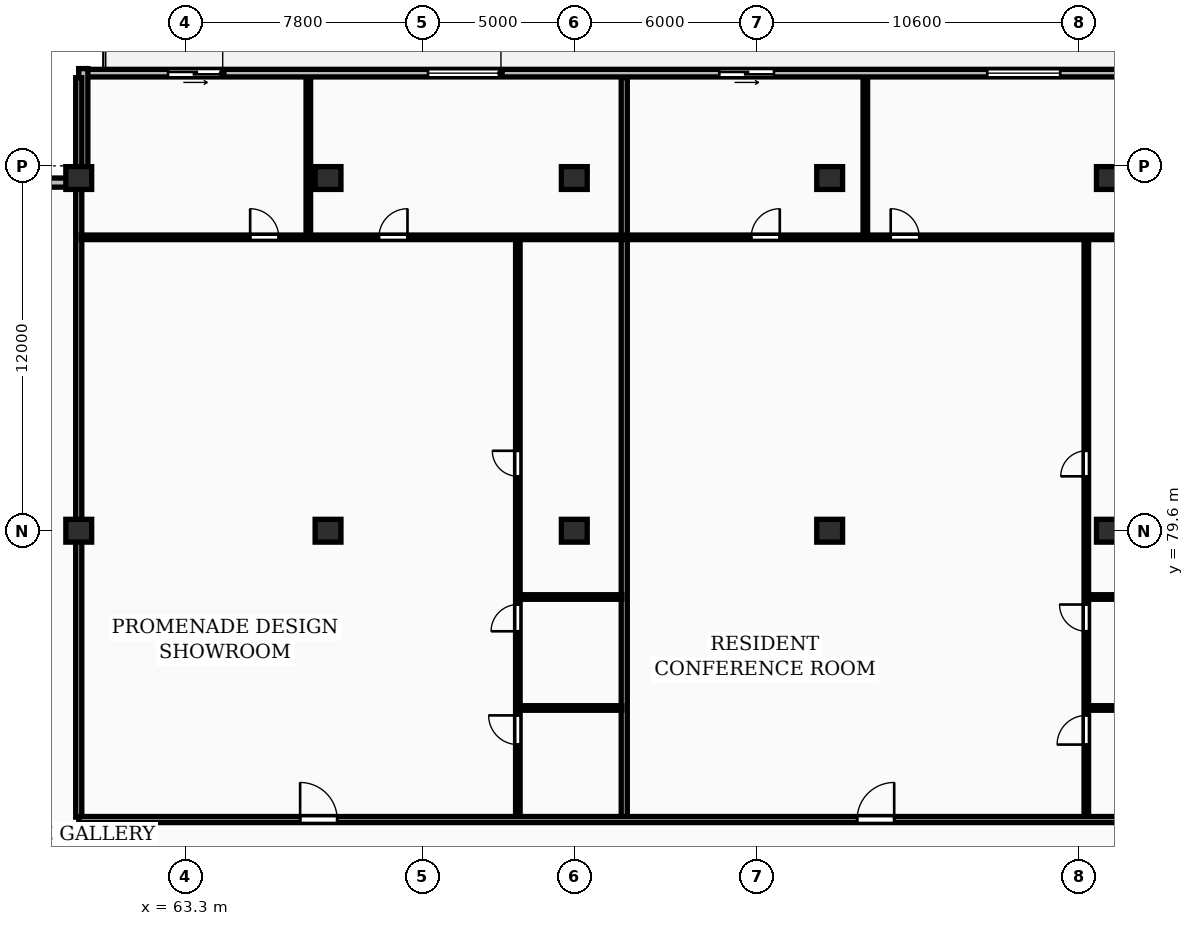
"""IFC4 building model, lengths in metres.
Left out: names, types, materials, properties, quantities, classifications, styles, units other than length and angle.
Written with IfcOpenShell. Run it as: python <this file> out.ifc"""

import sys

from ifc_helpers import new_model, si_unit, direction, frame, frame_2d, origin, origin_2d, place, context, subcontext, project, spatial, rectangle, extrude, element, fill, save


model = new_model("IFC4")
c1 = context("Model", 3, precision=1e-05, world=origin(), true_north=direction((0.0, 1.0)))
c2 = subcontext(c1, "Body", "Model", "MODEL_VIEW")
j1 = project(units=[si_unit("LENGTHUNIT", "METRE"), si_unit("PLANEANGLEUNIT", "RADIAN")], contexts=[c1])
p1 = place(None, origin())
s1 = spatial("IfcSite", under=j1, at=p1, CompositionType="ELEMENT")
p2 = place(p1, origin())
s2 = spatial("IfcBuilding", under=s1, at=p2, CompositionType="ELEMENT")
p3 = place(p2, frame((0.0, 0.0, 201.1)))
s3 = spatial("IfcBuildingStorey", under=s2, at=p3, CompositionType="ELEMENT", Elevation=201.1)
for number, where, z_axis, x_axis in (
    (1, (59.8, 79.6, 0.0), (0.0, 0.0, 1.0), (1.0, 0.0, 0.0)),
    (2, (59.8, 91.2, 0.0), (0.0, 0.0, 1.0), (1.0, 0.0, 0.0)),
    (3, (68.0, 79.6, 0.0), (0.0, 0.0, 1.0), (1.0, 0.0, 0.0)),
    (4, (68.0, 91.2, 0.0), (0.0, 0.0, 1.0), (1.0, 0.0, 0.0)),
    (5, (76.1, 79.6, 0.0), (0.0, 0.0, 1.0), (1.0, 0.0, 0.0)),
    (6, (76.1, 91.2, 0.0), (0.0, 0.0, 1.0), (1.0, 0.0, 0.0)),
    (7, (84.5, 79.6, 0.0), (0.0, 0.0, 1.0), (1.0, 0.0, 0.0)),
    (8, (84.5, 91.2, 0.0), (0.0, 0.0, 1.0), (1.0, 0.0, 0.0)),
    (9, (93.7, 79.6, 0.0), (0.0, 0.0, 1.0), (1.0, 0.0, 0.0)),
    (10, (93.7, 91.2, 0.0), (0.0, 0.0, 1.0), (1.0, 0.0, 0.0)),
):
    element("IfcColumn", number, at=place(p3, frame(where, z_axis=z_axis, x_axis=x_axis)), inside=s3, PredefinedType="COLUMN", context=c2, shape_type="SweptSolid", body=[
        extrude(rectangle(XDim=0.85, YDim=0.75, at=origin_2d()), origin(), (0.0, 0.0, 1.0), 3.25),
    ])
p4 = place(p3, frame((128.4, 94.65, 0.0), z_axis=(0.0, 0.0, 1.0), x_axis=(-1.0, 0.0, 0.0)))
e11 = element("IfcWall", 11, at=p4, inside=s3, PredefinedType="STANDARD", context=c2, shape_type="SweptSolid", body=[
    extrude(rectangle(XDim=68.6, YDim=0.25, at=frame_2d((34.3, 0.0))), origin(), (0.0, 0.0, 1.0), 2.97),
])
p5 = place(p4, frame((63.864, 0.0, 0.0)))
e12 = element("IfcOpeningElement", 12, at=p5, cuts=e11, PredefinedType="OPENING", context=c2, shape_type="SweptSolid", body=[
    extrude(rectangle(XDim=1.8, YDim=2.2, at=frame_2d((0.9, 1.1))), frame((0.0, 0.135, 0.0), z_axis=(0.0, -1.0, 0.0), x_axis=(1.0, 0.0, 0.0)), (0.0, 0.0, 1.0), 0.27),
])
p6 = place(p4, frame((54.713, 0.0, 0.85)))
e13 = element("IfcOpeningElement", 13, at=p6, cuts=e11, PredefinedType="OPENING", context=c2, shape_type="SweptSolid", body=[
    extrude(rectangle(XDim=2.4, YDim=1.9, at=frame_2d((1.2, 0.95))), frame((0.0, 0.135, 0.0), z_axis=(0.0, -1.0, 0.0), x_axis=(1.0, 0.0, 0.0)), (0.0, 0.0, 1.0), 0.27),
])
p7 = place(p4, frame((45.732, 0.0, 0.0)))
e14 = element("IfcOpeningElement", 14, at=p7, cuts=e11, PredefinedType="OPENING", context=c2, shape_type="SweptSolid", body=[
    extrude(rectangle(XDim=1.8, YDim=2.2, at=frame_2d((0.9, 1.1))), frame((0.0, 0.135, 0.0), z_axis=(0.0, -1.0, 0.0), x_axis=(1.0, 0.0, 0.0)), (0.0, 0.0, 1.0), 0.27),
])
p8 = place(p4, frame((36.318, 0.0, 0.85)))
e15 = element("IfcOpeningElement", 15, at=p8, cuts=e11, PredefinedType="OPENING", context=c2, shape_type="SweptSolid", body=[
    extrude(rectangle(XDim=2.4, YDim=1.9, at=frame_2d((1.2, 0.95))), frame((0.0, 0.135, 0.0), z_axis=(0.0, -1.0, 0.0), x_axis=(1.0, 0.0, 0.0)), (0.0, 0.0, 1.0), 0.27),
])
p9 = place(p4, frame((23.021, 0.0, 0.85)))
e16 = element("IfcOpeningElement", 16, at=p9, cuts=e11, PredefinedType="OPENING", context=c2, shape_type="SweptSolid", body=[
    extrude(rectangle(XDim=2.4, YDim=1.9, at=frame_2d((1.2, 0.95))), frame((0.0, 0.135, 0.0), z_axis=(0.0, -1.0, 0.0), x_axis=(1.0, 0.0, 0.0)), (0.0, 0.0, 1.0), 0.27),
])
p10 = place(p4, frame((29.043, 0.0, 0.0)))
e17 = element("IfcOpeningElement", 17, at=p10, cuts=e11, PredefinedType="OPENING", context=c2, shape_type="SweptSolid", body=[
    extrude(rectangle(XDim=1.8, YDim=2.2, at=frame_2d((0.9, 1.1))), frame((0.0, 0.135, 0.0), z_axis=(0.0, -1.0, 0.0), x_axis=(1.0, 0.0, 0.0)), (0.0, 0.0, 1.0), 0.27),
])
p11 = place(p4, frame((17.209, 0.0, 0.85)))
e18 = element("IfcOpeningElement", 18, at=p11, cuts=e11, PredefinedType="OPENING", context=c2, shape_type="SweptSolid", body=[
    extrude(rectangle(XDim=2.4, YDim=1.9, at=frame_2d((1.2, 0.95))), frame((0.0, 0.135, 0.0), z_axis=(0.0, -1.0, 0.0), x_axis=(1.0, 0.0, 0.0)), (0.0, 0.0, 1.0), 0.27),
])
p12 = place(p4, frame((6.712, 0.0, 0.85)))
e19 = element("IfcOpeningElement", 19, at=p12, cuts=e11, PredefinedType="OPENING", context=c2, shape_type="SweptSolid", body=[
    extrude(rectangle(XDim=2.4, YDim=1.9, at=frame_2d((1.2, 0.95))), frame((0.0, 0.135, 0.0), z_axis=(0.0, -1.0, 0.0), x_axis=(1.0, 0.0, 0.0)), (0.0, 0.0, 1.0), 0.27),
])
p13 = place(p4, frame((12.824, 0.0, 0.0)))
e20 = element("IfcOpeningElement", 20, at=p13, cuts=e11, PredefinedType="OPENING", context=c2, shape_type="SweptSolid", body=[
    extrude(rectangle(XDim=1.8, YDim=2.2, at=frame_2d((0.9, 1.1))), frame((0.0, 0.135, 0.0), z_axis=(0.0, -1.0, 0.0), x_axis=(1.0, 0.0, 0.0)), (0.0, 0.0, 1.0), 0.27),
])
p14 = place(p4, frame((1.025, 0.0, 0.85)))
e21 = element("IfcOpeningElement", 21, at=p14, cuts=e11, PredefinedType="OPENING", context=c2, shape_type="SweptSolid", body=[
    extrude(rectangle(XDim=2.4, YDim=1.9, at=frame_2d((1.2, 0.95))), frame((0.0, 0.135, 0.0), z_axis=(0.0, -1.0, 0.0), x_axis=(1.0, 0.0, 0.0)), (0.0, 0.0, 1.0), 0.27),
])
for number, where, z_axis, x_axis in (
    (22, (59.95, 94.8, 0.0), (0.0, 0.0, 1.0), (0.0, -1.0, 0.0)),
    (23, (59.8, 91.05, 0.0), (0.0, 0.0, 1.0), (-1.0, 0.0, 0.0)),
):
    element("IfcWall", number, at=place(p3, frame(where, z_axis=z_axis, x_axis=x_axis)), inside=s3, PredefinedType="STANDARD", context=c2, shape_type="SweptSolid", body=[
        extrude(rectangle(XDim=3.6, YDim=0.3, at=frame_2d((1.8, 0.0))), origin(), (0.0, 0.0, 1.0), 2.97),
    ])
p15 = place(p3, frame((59.8, 70.18, 0.0), z_axis=(0.0, 0.0, 1.0), x_axis=(0.0, 1.0, 0.0)))
e24 = element("IfcWall", 24, at=p15, inside=s3, PredefinedType="PARTITIONING", context=c2, shape_type="SweptSolid", body=[
    extrude(rectangle(XDim=24.32, YDim=0.2, at=frame_2d((12.16, 0.0))), origin(), (0.0, 0.0, 1.0), 2.277),
])
p16 = place(p3, frame((77.743, 70.18, 0.0), z_axis=(0.0, 0.0, 1.0), x_axis=(0.0, 1.0, 0.0)))
e25 = element("IfcWall", 25, at=p16, inside=s3, PredefinedType="PARTITIONING", context=c2, shape_type="SweptSolid", body=[
    extrude(rectangle(XDim=24.32, YDim=0.2, at=frame_2d((12.16, 0.0))), origin(), (0.0, 0.0, 1.0), 2.97),
])
for number, where, z_axis, x_axis in (
    (26, (74.303, 73.77, 0.0), (0.0, 0.0, 1.0), (1.0, 0.0, 0.0)),
    (27, (74.303, 77.42, 0.0), (0.0, 0.0, 1.0), (1.0, 0.0, 0.0)),
):
    element("IfcWall", number, at=place(p3, frame(where, z_axis=z_axis, x_axis=x_axis)), inside=s3, PredefinedType="PARTITIONING", context=c2, shape_type="SweptSolid", body=[
        extrude(rectangle(XDim=3.36, YDim=0.15, at=frame_2d((1.68, 0.0))), origin(), (0.0, 0.0, 1.0), 2.97),
    ])
p17 = place(p3, frame((74.243, 70.16, 0.0), z_axis=(0.0, 0.0, 1.0), x_axis=(0.0, 1.0, 0.0)))
e28 = element("IfcWall", 28, at=p17, inside=s3, PredefinedType="PARTITIONING", context=c2, shape_type="SweptSolid", body=[
    extrude(rectangle(XDim=19.03, YDim=0.15, at=frame_2d((9.515, 0.0))), origin(), (0.0, 0.0, 1.0), 2.97),
])
p18 = place(p17, frame((2.406, 0.0, 0.0)))
e29 = element("IfcOpeningElement", 29, at=p18, cuts=e28, PredefinedType="OPENING", context=c2, shape_type="SweptSolid", body=[
    extrude(rectangle(XDim=0.96, YDim=2.1, at=frame_2d((0.48, 1.05))), frame((0.0, 0.085, 0.0), z_axis=(0.0, -1.0, 0.0), x_axis=(1.0, 0.0, 0.0)), (0.0, 0.0, 1.0), 0.17),
])
p19 = place(p17, frame((6.133, 0.0, 0.0)))
e30 = element("IfcOpeningElement", 30, at=p19, cuts=e28, PredefinedType="OPENING", context=c2, shape_type="SweptSolid", body=[
    extrude(rectangle(XDim=0.88, YDim=2.06, at=frame_2d((0.44, 1.03))), frame((0.0, 0.085, 0.0), z_axis=(0.0, -1.0, 0.0), x_axis=(1.0, 0.0, 0.0)), (0.0, 0.0, 1.0), 0.17),
])
p20 = place(p17, frame((11.229, 0.0, 0.0)))
e31 = element("IfcOpeningElement", 31, at=p20, cuts=e28, PredefinedType="OPENING", context=c2, shape_type="SweptSolid", body=[
    extrude(rectangle(XDim=0.84, YDim=2.04, at=frame_2d((0.42, 1.02))), frame((0.0, 0.085, 0.0), z_axis=(0.0, -1.0, 0.0), x_axis=(1.0, 0.0, 0.0)), (0.0, 0.0, 1.0), 0.17),
])
p21 = place(p3, frame((67.352, 89.33, 0.0), z_axis=(0.0, 0.0, 1.0), x_axis=(0.0, 1.0, 0.0)))
e32 = element("IfcWall", 32, at=p21, inside=s3, PredefinedType="PARTITIONING", context=c2, shape_type="SweptSolid", body=[
    extrude(rectangle(XDim=5.17, YDim=0.15, at=frame_2d((2.585, 0.0))), origin(), (0.0, 0.0, 1.0), 2.97),
])
p22 = place(p3, frame((59.88, 89.25, 0.0), z_axis=(0.0, 0.0, 1.0), x_axis=(1.0, 0.0, 0.0)))
e33 = element("IfcWall", 33, at=p22, inside=s3, PredefinedType="PARTITIONING", context=c2, shape_type="SweptSolid", body=[
    extrude(rectangle(XDim=17.783, YDim=0.15, at=frame_2d((8.892, 0.0))), origin(), (0.0, 0.0, 1.0), 2.97),
])
p23 = place(p22, frame((5.558, 0.0, 0.0)))
e34 = element("IfcOpeningElement", 34, at=p23, cuts=e33, PredefinedType="OPENING", context=c2, shape_type="SweptSolid", body=[
    extrude(rectangle(XDim=0.94, YDim=2.1, at=frame_2d((0.47, 1.05))), frame((0.0, 0.085, 0.0), z_axis=(0.0, -1.0, 0.0), x_axis=(1.0, 0.0, 0.0)), (0.0, 0.0, 1.0), 0.17),
])
p24 = place(p22, frame((9.793, 0.0, 0.0)))
e35 = element("IfcOpeningElement", 35, at=p24, cuts=e33, PredefinedType="OPENING", context=c2, shape_type="SweptSolid", body=[
    extrude(rectangle(XDim=0.94, YDim=2.1, at=frame_2d((0.47, 1.05))), frame((0.0, 0.085, 0.0), z_axis=(0.0, -1.0, 0.0), x_axis=(1.0, 0.0, 0.0)), (0.0, 0.0, 1.0), 0.17),
])
for number, where, z_axis, x_axis in (
    (36, (93.002, 73.77, 0.0), (0.0, 0.0, 1.0), (1.0, 0.0, 0.0)),
    (37, (93.002, 77.42, 0.0), (0.0, 0.0, 1.0), (1.0, 0.0, 0.0)),
):
    element("IfcWall", number, at=place(p3, frame(where, z_axis=z_axis, x_axis=x_axis)), inside=s3, PredefinedType="PARTITIONING", context=c2, shape_type="SweptSolid", body=[
        extrude(rectangle(XDim=3.13, YDim=0.15, at=frame_2d((1.565, 0.0))), origin(), (0.0, 0.0, 1.0), 2.97),
    ])
p25 = place(p3, frame((92.942, 70.16, 0.0), z_axis=(0.0, 0.0, 1.0), x_axis=(0.0, 1.0, 0.0)))
e38 = element("IfcWall", 38, at=p25, inside=s3, PredefinedType="PARTITIONING", context=c2, shape_type="SweptSolid", body=[
    extrude(rectangle(XDim=19.03, YDim=0.15, at=frame_2d((9.515, 0.0))), origin(), (0.0, 0.0, 1.0), 2.97),
])
p26 = place(p25, frame((2.406, 0.0, 0.0)))
e39 = element("IfcOpeningElement", 39, at=p26, cuts=e38, PredefinedType="OPENING", context=c2, shape_type="SweptSolid", body=[
    extrude(rectangle(XDim=0.96, YDim=2.1, at=frame_2d((0.48, 1.05))), frame((0.0, 0.085, 0.0), z_axis=(0.0, -1.0, 0.0), x_axis=(1.0, 0.0, 0.0)), (0.0, 0.0, 1.0), 0.17),
])
p27 = place(p25, frame((6.133, 0.0, 0.0)))
e40 = element("IfcOpeningElement", 40, at=p27, cuts=e38, PredefinedType="OPENING", context=c2, shape_type="SweptSolid", body=[
    extrude(rectangle(XDim=0.88, YDim=2.06, at=frame_2d((0.44, 1.03))), frame((0.0, 0.085, 0.0), z_axis=(0.0, -1.0, 0.0), x_axis=(1.0, 0.0, 0.0)), (0.0, 0.0, 1.0), 0.17),
])
p28 = place(p25, frame((11.229, 0.0, 0.0)))
e41 = element("IfcOpeningElement", 41, at=p28, cuts=e38, PredefinedType="OPENING", context=c2, shape_type="SweptSolid", body=[
    extrude(rectangle(XDim=0.84, YDim=2.04, at=frame_2d((0.42, 1.02))), frame((0.0, 0.085, 0.0), z_axis=(0.0, -1.0, 0.0), x_axis=(1.0, 0.0, 0.0)), (0.0, 0.0, 1.0), 0.17),
])
p29 = place(p3, frame((85.672, 89.33, 0.0), z_axis=(0.0, 0.0, 1.0), x_axis=(0.0, 1.0, 0.0)))
e42 = element("IfcWall", 42, at=p29, inside=s3, PredefinedType="PARTITIONING", context=c2, shape_type="SweptSolid", body=[
    extrude(rectangle(XDim=5.17, YDim=0.15, at=frame_2d((2.585, 0.0))), origin(), (0.0, 0.0, 1.0), 2.97),
])
p30 = place(p3, frame((77.823, 89.25, 0.0), z_axis=(0.0, 0.0, 1.0), x_axis=(1.0, 0.0, 0.0)))
e43 = element("IfcWall", 43, at=p30, inside=s3, PredefinedType="PARTITIONING", context=c2, shape_type="SweptSolid", body=[
    extrude(rectangle(XDim=18.308, YDim=0.15, at=frame_2d((9.154, 0.0))), origin(), (0.0, 0.0, 1.0), 2.97),
])
p31 = place(p30, frame((4.095, 0.0, 0.0)))
e44 = element("IfcOpeningElement", 44, at=p31, cuts=e43, PredefinedType="OPENING", context=c2, shape_type="SweptSolid", body=[
    extrude(rectangle(XDim=0.94, YDim=2.1, at=frame_2d((0.47, 1.05))), frame((0.0, 0.085, 0.0), z_axis=(0.0, -1.0, 0.0), x_axis=(1.0, 0.0, 0.0)), (0.0, 0.0, 1.0), 0.17),
])
p32 = place(p30, frame((8.684, 0.0, 0.0)))
e45 = element("IfcOpeningElement", 45, at=p32, cuts=e43, PredefinedType="OPENING", context=c2, shape_type="SweptSolid", body=[
    extrude(rectangle(XDim=0.94, YDim=2.1, at=frame_2d((0.47, 1.05))), frame((0.0, 0.085, 0.0), z_axis=(0.0, -1.0, 0.0), x_axis=(1.0, 0.0, 0.0)), (0.0, 0.0, 1.0), 0.17),
])
p33 = place(p3, frame((59.8, 70.1, 0.0), z_axis=(0.0, 0.0, 1.0), x_axis=(1.0, 0.0, 0.0)))
e46 = element("IfcWall", 46, at=p33, inside=s3, PredefinedType="PARTITIONING", context=c2, shape_type="SweptSolid", body=[
    extrude(rectangle(XDim=68.6, YDim=0.2, at=frame_2d((34.3, 0.0))), origin(), (0.0, 0.0, 1.0), 2.97),
])
p34 = place(p33, frame((7.281, 0.0, 0.0)))
e47 = element("IfcOpeningElement", 47, at=p34, cuts=e46, PredefinedType="OPENING", context=c2, shape_type="SweptSolid", body=[
    extrude(rectangle(XDim=1.22, YDim=2.18, at=frame_2d((0.61, 1.09))), frame((0.0, 0.11, 0.0), z_axis=(0.0, -1.0, 0.0), x_axis=(1.0, 0.0, 0.0)), (0.0, 0.0, 1.0), 0.22),
])
p35 = place(p33, frame((25.602, 0.0, 0.0)))
e48 = element("IfcOpeningElement", 48, at=p35, cuts=e46, PredefinedType="OPENING", context=c2, shape_type="SweptSolid", body=[
    extrude(rectangle(XDim=1.22, YDim=2.18, at=frame_2d((0.61, 1.09))), frame((0.0, 0.11, 0.0), z_axis=(0.0, -1.0, 0.0), x_axis=(1.0, 0.0, 0.0)), (0.0, 0.0, 1.0), 0.22),
])
p36 = place(p33, frame((38.457, 0.0, 0.0)))
e49 = element("IfcOpeningElement", 49, at=p36, cuts=e46, PredefinedType="OPENING", context=c2, shape_type="SweptSolid", body=[
    extrude(rectangle(XDim=0.95, YDim=2.15, at=frame_2d((0.475, 1.075))), frame((0.0, 0.11, 0.0), z_axis=(0.0, -1.0, 0.0), x_axis=(1.0, 0.0, 0.0)), (0.0, 0.0, 1.0), 0.22),
])
p37 = place(p33, frame((54.571, 0.0, 0.0)))
e50 = element("IfcOpeningElement", 50, at=p37, cuts=e46, PredefinedType="OPENING", context=c2, shape_type="SweptSolid", body=[
    extrude(rectangle(XDim=0.95, YDim=2.15, at=frame_2d((0.475, 1.075))), frame((0.0, 0.11, 0.0), z_axis=(0.0, -1.0, 0.0), x_axis=(1.0, 0.0, 0.0)), (0.0, 0.0, 1.0), 0.22),
])
p38 = place(p5, origin())
e51 = element("IfcDoor", 51, at=p38, inside=s3, OperationType="SLIDING_TO_LEFT", PredefinedType="DOOR", context=c2, shape_type="SweptSolid", body=[
    extrude(rectangle(XDim=1.8, YDim=2.2, at=frame_2d((0.9, 1.1))), frame((0.0, 0.025, 0.0), z_axis=(0.0, -1.0, 0.0), x_axis=(1.0, 0.0, 0.0)), (0.0, 0.0, 1.0), 0.05),
])
fill(e12, e51)
p39 = place(p6, origin())
e52 = element("IfcWindow", 52, at=p39, inside=s3, PartitioningType="DOUBLE_PANEL_VERTICAL", PredefinedType="WINDOW", context=c2, shape_type="SweptSolid", body=[
    extrude(rectangle(XDim=2.4, YDim=1.9, at=frame_2d((1.2, 0.95))), frame((0.0, 0.03, 0.0), z_axis=(0.0, -1.0, 0.0), x_axis=(1.0, 0.0, 0.0)), (0.0, 0.0, 1.0), 0.06),
])
fill(e13, e52)
p40 = place(p7, origin())
e53 = element("IfcDoor", 53, at=p40, inside=s3, OperationType="SLIDING_TO_LEFT", PredefinedType="DOOR", context=c2, shape_type="SweptSolid", body=[
    extrude(rectangle(XDim=1.8, YDim=2.2, at=frame_2d((0.9, 1.1))), frame((0.0, 0.025, 0.0), z_axis=(0.0, -1.0, 0.0), x_axis=(1.0, 0.0, 0.0)), (0.0, 0.0, 1.0), 0.05),
])
fill(e14, e53)
p41 = place(p8, origin())
e54 = element("IfcWindow", 54, at=p41, inside=s3, PartitioningType="DOUBLE_PANEL_VERTICAL", PredefinedType="WINDOW", context=c2, shape_type="SweptSolid", body=[
    extrude(rectangle(XDim=2.4, YDim=1.9, at=frame_2d((1.2, 0.95))), frame((0.0, 0.03, 0.0), z_axis=(0.0, -1.0, 0.0), x_axis=(1.0, 0.0, 0.0)), (0.0, 0.0, 1.0), 0.06),
])
fill(e15, e54)
p42 = place(p18, origin())
e55 = element("IfcDoor", 55, at=p42, inside=s3, OperationType="SINGLE_SWING_RIGHT", PredefinedType="DOOR", context=c2, shape_type="SweptSolid", body=[
    extrude(rectangle(XDim=0.96, YDim=2.1, at=frame_2d((0.48, 1.05))), frame((0.0, 0.025, 0.0), z_axis=(0.0, -1.0, 0.0), x_axis=(1.0, 0.0, 0.0)), (0.0, 0.0, 1.0), 0.05),
])
fill(e29, e55)
p43 = place(p19, origin())
e56 = element("IfcDoor", 56, at=p43, inside=s3, OperationType="SINGLE_SWING_LEFT", PredefinedType="DOOR", context=c2, shape_type="SweptSolid", body=[
    extrude(rectangle(XDim=0.88, YDim=2.06, at=frame_2d((0.44, 1.03))), frame((0.0, 0.025, 0.0), z_axis=(0.0, -1.0, 0.0), x_axis=(1.0, 0.0, 0.0)), (0.0, 0.0, 1.0), 0.05),
])
fill(e30, e56)
p44 = place(p20, origin())
e57 = element("IfcDoor", 57, at=p44, inside=s3, OperationType="SINGLE_SWING_RIGHT", PredefinedType="DOOR", context=c2, shape_type="SweptSolid", body=[
    extrude(rectangle(XDim=0.84, YDim=2.04, at=frame_2d((0.42, 1.02))), frame((0.0, 0.025, 0.0), z_axis=(0.0, -1.0, 0.0), x_axis=(1.0, 0.0, 0.0)), (0.0, 0.0, 1.0), 0.05),
])
fill(e31, e57)
p45 = place(p23, origin())
e58 = element("IfcDoor", 58, at=p45, inside=s3, OperationType="SINGLE_SWING_LEFT", PredefinedType="DOOR", context=c2, shape_type="SweptSolid", body=[
    extrude(rectangle(XDim=0.94, YDim=2.1, at=frame_2d((0.47, 1.05))), frame((0.0, 0.025, 0.0), z_axis=(0.0, -1.0, 0.0), x_axis=(1.0, 0.0, 0.0)), (0.0, 0.0, 1.0), 0.05),
])
fill(e34, e58)
p46 = place(p24, origin())
e59 = element("IfcDoor", 59, at=p46, inside=s3, OperationType="SINGLE_SWING_RIGHT", PredefinedType="DOOR", context=c2, shape_type="SweptSolid", body=[
    extrude(rectangle(XDim=0.94, YDim=2.1, at=frame_2d((0.47, 1.05))), frame((0.0, 0.025, 0.0), z_axis=(0.0, -1.0, 0.0), x_axis=(1.0, 0.0, 0.0)), (0.0, 0.0, 1.0), 0.05),
])
fill(e35, e59)
p47 = place(p26, origin())
e60 = element("IfcDoor", 60, at=p47, inside=s3, OperationType="SINGLE_SWING_LEFT", PredefinedType="DOOR", context=c2, shape_type="SweptSolid", body=[
    extrude(rectangle(XDim=0.96, YDim=2.1, at=frame_2d((0.48, 1.05))), frame((0.0, 0.025, 0.0), z_axis=(0.0, -1.0, 0.0), x_axis=(1.0, 0.0, 0.0)), (0.0, 0.0, 1.0), 0.05),
])
fill(e39, e60)
p48 = place(p27, origin())
e61 = element("IfcDoor", 61, at=p48, inside=s3, OperationType="SINGLE_SWING_RIGHT", PredefinedType="DOOR", context=c2, shape_type="SweptSolid", body=[
    extrude(rectangle(XDim=0.88, YDim=2.06, at=frame_2d((0.44, 1.03))), frame((0.0, 0.025, 0.0), z_axis=(0.0, -1.0, 0.0), x_axis=(1.0, 0.0, 0.0)), (0.0, 0.0, 1.0), 0.05),
])
fill(e40, e61)
p49 = place(p28, origin())
e62 = element("IfcDoor", 62, at=p49, inside=s3, OperationType="SINGLE_SWING_LEFT", PredefinedType="DOOR", context=c2, shape_type="SweptSolid", body=[
    extrude(rectangle(XDim=0.84, YDim=2.04, at=frame_2d((0.42, 1.02))), frame((0.0, 0.025, 0.0), z_axis=(0.0, -1.0, 0.0), x_axis=(1.0, 0.0, 0.0)), (0.0, 0.0, 1.0), 0.05),
])
fill(e41, e62)
p50 = place(p31, origin())
e63 = element("IfcDoor", 63, at=p50, inside=s3, OperationType="SINGLE_SWING_RIGHT", PredefinedType="DOOR", context=c2, shape_type="SweptSolid", body=[
    extrude(rectangle(XDim=0.94, YDim=2.1, at=frame_2d((0.47, 1.05))), frame((0.0, 0.025, 0.0), z_axis=(0.0, -1.0, 0.0), x_axis=(1.0, 0.0, 0.0)), (0.0, 0.0, 1.0), 0.05),
])
fill(e44, e63)
p51 = place(p32, origin())
e64 = element("IfcDoor", 64, at=p51, inside=s3, OperationType="SINGLE_SWING_LEFT", PredefinedType="DOOR", context=c2, shape_type="SweptSolid", body=[
    extrude(rectangle(XDim=0.94, YDim=2.1, at=frame_2d((0.47, 1.05))), frame((0.0, 0.025, 0.0), z_axis=(0.0, -1.0, 0.0), x_axis=(1.0, 0.0, 0.0)), (0.0, 0.0, 1.0), 0.05),
])
fill(e45, e64)
p52 = place(p34, origin())
e65 = element("IfcDoor", 65, at=p52, inside=s3, OperationType="SINGLE_SWING_LEFT", PredefinedType="DOOR", context=c2, shape_type="SweptSolid", body=[
    extrude(rectangle(XDim=1.22, YDim=2.18, at=frame_2d((0.61, 1.09))), frame((0.0, 0.025, 0.0), z_axis=(0.0, -1.0, 0.0), x_axis=(1.0, 0.0, 0.0)), (0.0, 0.0, 1.0), 0.05),
])
fill(e47, e65)
p53 = place(p35, origin())
e66 = element("IfcDoor", 66, at=p53, inside=s3, OperationType="SINGLE_SWING_RIGHT", PredefinedType="DOOR", context=c2, shape_type="SweptSolid", body=[
    extrude(rectangle(XDim=1.22, YDim=2.18, at=frame_2d((0.61, 1.09))), frame((0.0, 0.025, 0.0), z_axis=(0.0, -1.0, 0.0), x_axis=(1.0, 0.0, 0.0)), (0.0, 0.0, 1.0), 0.05),
])
fill(e48, e66)
save(model, sys.argv[1])
